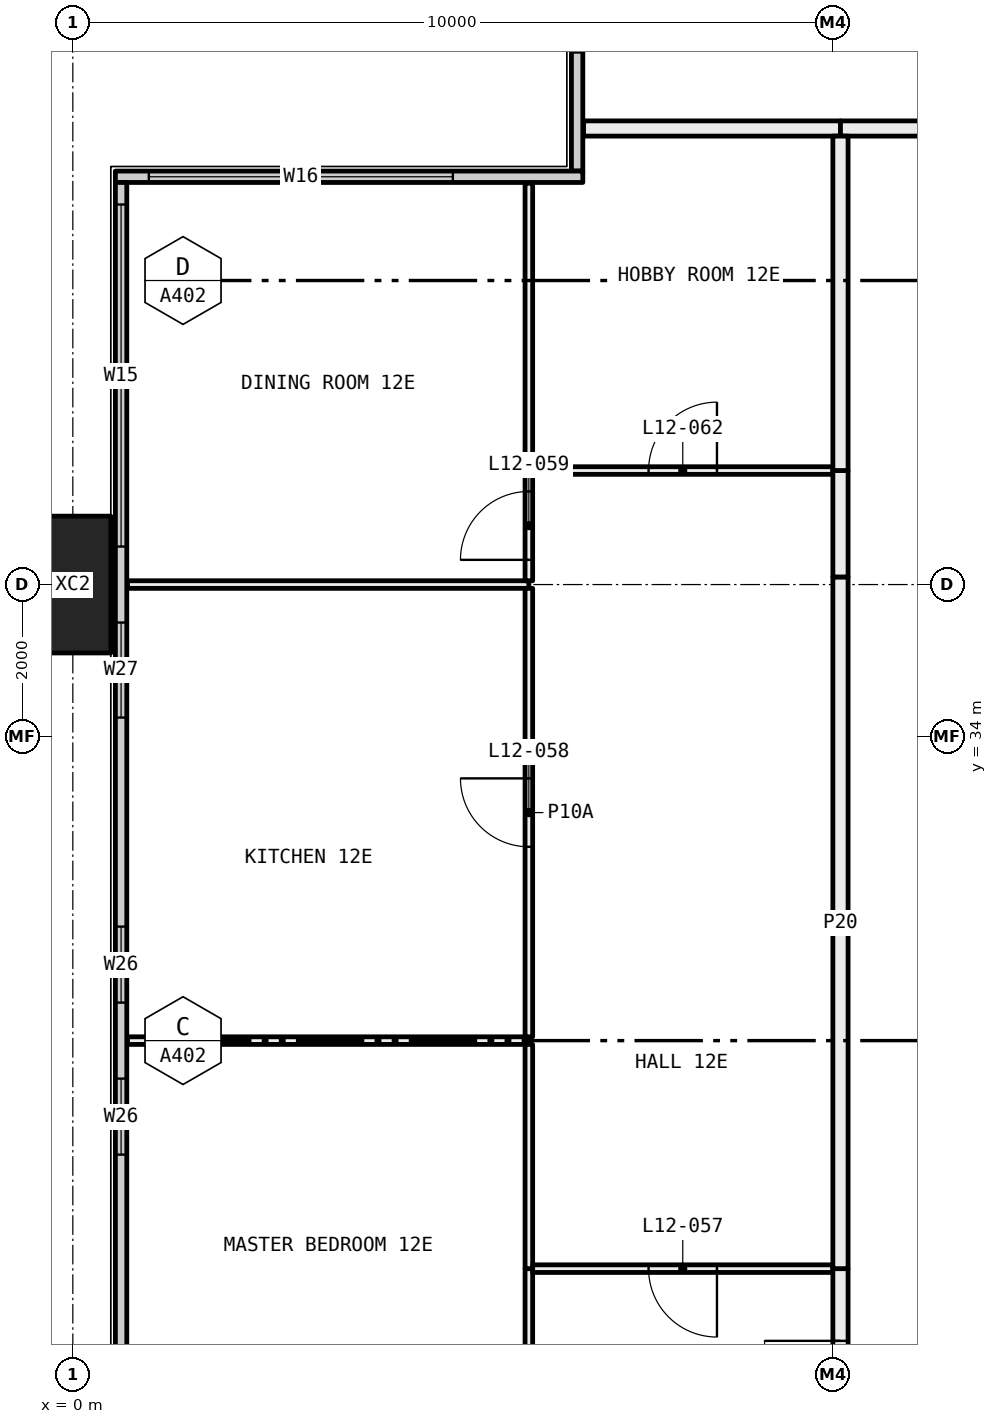
"""IFC4 building model, lengths in metres.
Left out: names, types, materials, properties, quantities, classifications, styles, units other than length and angle.
Written with IfcOpenShell. Run it as: python <this file> out.ifc"""

import sys

from ifc_helpers import new_model, si_unit, direction, frame, frame_2d, origin, origin_2d, place, context, subcontext, project, spatial, rectangle, hollow_rectangle, extrude, element, fill, save


model = new_model("IFC4")
c1 = context("Model", 3, precision=1e-05, world=origin(), true_north=direction((0.0, 1.0)))
c2 = subcontext(c1, "Body", "Model", "MODEL_VIEW")
j1 = project(units=[si_unit("LENGTHUNIT", "METRE"), si_unit("PLANEANGLEUNIT", "RADIAN")], contexts=[c1])
p1 = place(None, origin())
s1 = spatial("IfcSite", under=j1, at=p1, CompositionType="ELEMENT")
p2 = place(p1, origin())
s2 = spatial("IfcBuilding", under=s1, at=p2, CompositionType="ELEMENT")
p3 = place(p2, frame((0.0, 0.0, 54.15)))
s3 = spatial("IfcBuildingStorey", under=s2, at=p3, CompositionType="ELEMENT", Elevation=54.15)
p4 = place(p3, frame((0.0, 36.0, -0.4), z_axis=(0.0, 0.0, 1.0), x_axis=(0.0, 1.0, 0.0)))
e1 = element("IfcColumn", 1, at=p4, inside=s3, PredefinedType="COLUMN", context=c2, shape_type="SweptSolid", body=[
    extrude(hollow_rectangle(XDim=1.8, YDim=1.0, WallThickness=0.07, at=origin_2d()), origin(), (0.0, 0.0, 1.0), 3.45),
])
p5 = place(p3, frame((6.635, 41.44, 0.0), z_axis=(0.0, 0.0, 1.0), x_axis=(0.0, 1.0, 0.0)))
e2 = element("IfcWall", 2, at=p5, inside=s3, PredefinedType="ELEMENTEDWALL", context=c2, shape_type="SweptSolid", body=[
    extrude(rectangle(XDim=5.85, YDim=0.15, at=frame_2d((2.925, 0.0))), origin(), (0.0, 0.0, 1.0), 3.05),
])
p6 = place(p5, frame((1.56, 0.0, 0.45)))
e3 = element("IfcOpeningElement", 3, at=p6, cuts=e2, PredefinedType="OPENING", context=c2, shape_type="SweptSolid", body=[
    extrude(rectangle(XDim=4.0, YDim=2.55, at=frame_2d((2.0, 1.275))), frame((0.0, 0.085, 0.0), z_axis=(0.0, -1.0, 0.0), x_axis=(1.0, 0.0, 0.0)), (0.0, 0.0, 1.0), 0.17),
])
p7 = place(p3, frame((0.56, 41.365, 0.0), z_axis=(0.0, 0.0, 1.0), x_axis=(1.0, 0.0, 0.0)))
e4 = element("IfcWall", 4, at=p7, inside=s3, PredefinedType="ELEMENTEDWALL", context=c2, shape_type="SweptSolid", body=[
    extrude(rectangle(XDim=6.15, YDim=0.15, at=frame_2d((3.075, 0.0))), origin(), (0.0, 0.0, 1.0), 3.05),
])
p8 = place(p7, frame((0.44, 0.0, 0.45)))
e5 = element("IfcOpeningElement", 5, at=p8, cuts=e4, PredefinedType="OPENING", context=c2, shape_type="SweptSolid", body=[
    extrude(rectangle(XDim=4.0, YDim=2.55, at=frame_2d((2.0, 1.275))), frame((0.0, 0.085, 0.0), z_axis=(0.0, -1.0, 0.0), x_axis=(1.0, 0.0, 0.0)), (0.0, 0.0, 1.0), 0.17),
])
p9 = place(p3, frame((0.635, 6.71, 0.0), z_axis=(0.0, 0.0, 1.0), x_axis=(0.0, 1.0, 0.0)))
e6 = element("IfcWall", 6, at=p9, inside=s3, PredefinedType="ELEMENTEDWALL", context=c2, shape_type="SweptSolid", body=[
    extrude(rectangle(XDim=34.58, YDim=0.15, at=frame_2d((17.29, 0.0))), origin(), (0.0, 0.0, 1.0), 3.05),
])
p10 = place(p9, frame((0.29, 0.0, 0.45)))
e7 = element("IfcOpeningElement", 7, at=p10, cuts=e6, PredefinedType="OPENING", context=c2, shape_type="SweptSolid", body=[
    extrude(rectangle(XDim=4.5, YDim=2.55, at=frame_2d((2.25, 1.275))), frame((0.0, 0.085, 0.0), z_axis=(0.0, -1.0, 0.0), x_axis=(1.0, 0.0, 0.0)), (0.0, 0.0, 1.0), 0.17),
])
p11 = place(p9, frame((5.79, 0.0, 0.45)))
e8 = element("IfcOpeningElement", 8, at=p11, cuts=e6, PredefinedType="OPENING", context=c2, shape_type="SweptSolid", body=[
    extrude(rectangle(XDim=1.25, YDim=2.55, at=frame_2d((0.625, 1.275))), frame((0.0, 0.085, 0.0), z_axis=(0.0, -1.0, 0.0), x_axis=(1.0, 0.0, 0.0)), (0.0, 0.0, 1.0), 0.17),
])
p12 = place(p9, frame((9.79, 0.0, 0.45)))
e9 = element("IfcOpeningElement", 9, at=p12, cuts=e6, PredefinedType="OPENING", context=c2, shape_type="SweptSolid", body=[
    extrude(rectangle(XDim=1.0, YDim=2.55, at=frame_2d((0.5, 1.275))), frame((0.0, 0.085, 0.0), z_axis=(0.0, -1.0, 0.0), x_axis=(1.0, 0.0, 0.0)), (0.0, 0.0, 1.0), 0.17),
])
p13 = place(p9, frame((11.79, 0.0, 0.45)))
e10 = element("IfcOpeningElement", 10, at=p13, cuts=e6, PredefinedType="OPENING", context=c2, shape_type="SweptSolid", body=[
    extrude(rectangle(XDim=1.0, YDim=2.55, at=frame_2d((0.5, 1.275))), frame((0.0, 0.085, 0.0), z_axis=(0.0, -1.0, 0.0), x_axis=(1.0, 0.0, 0.0)), (0.0, 0.0, 1.0), 0.17),
])
p14 = place(p9, frame((15.54, 0.0, 0.45)))
e11 = element("IfcOpeningElement", 11, at=p14, cuts=e6, PredefinedType="OPENING", context=c2, shape_type="SweptSolid", body=[
    extrude(rectangle(XDim=1.25, YDim=2.55, at=frame_2d((0.625, 1.275))), frame((0.0, 0.085, 0.0), z_axis=(0.0, -1.0, 0.0), x_axis=(1.0, 0.0, 0.0)), (0.0, 0.0, 1.0), 0.17),
])
p15 = place(p9, frame((17.79, 0.0, 0.45)))
e12 = element("IfcOpeningElement", 12, at=p15, cuts=e6, PredefinedType="OPENING", context=c2, shape_type="SweptSolid", body=[
    extrude(rectangle(XDim=1.25, YDim=2.55, at=frame_2d((0.625, 1.275))), frame((0.0, 0.085, 0.0), z_axis=(0.0, -1.0, 0.0), x_axis=(1.0, 0.0, 0.0)), (0.0, 0.0, 1.0), 0.17),
])
p16 = place(p9, frame((21.79, 0.0, 0.45)))
e13 = element("IfcOpeningElement", 13, at=p16, cuts=e6, PredefinedType="OPENING", context=c2, shape_type="SweptSolid", body=[
    extrude(rectangle(XDim=1.0, YDim=2.55, at=frame_2d((0.5, 1.275))), frame((0.0, 0.085, 0.0), z_axis=(0.0, -1.0, 0.0), x_axis=(1.0, 0.0, 0.0)), (0.0, 0.0, 1.0), 0.17),
])
p17 = place(p9, frame((23.79, 0.0, 0.45)))
e14 = element("IfcOpeningElement", 14, at=p17, cuts=e6, PredefinedType="OPENING", context=c2, shape_type="SweptSolid", body=[
    extrude(rectangle(XDim=1.0, YDim=2.55, at=frame_2d((0.5, 1.275))), frame((0.0, 0.085, 0.0), z_axis=(0.0, -1.0, 0.0), x_axis=(1.0, 0.0, 0.0)), (0.0, 0.0, 1.0), 0.17),
])
p18 = place(p9, frame((27.54, 0.0, 0.45)))
e15 = element("IfcOpeningElement", 15, at=p18, cuts=e6, PredefinedType="OPENING", context=c2, shape_type="SweptSolid", body=[
    extrude(rectangle(XDim=1.25, YDim=2.55, at=frame_2d((0.625, 1.275))), frame((0.0, 0.085, 0.0), z_axis=(0.0, -1.0, 0.0), x_axis=(1.0, 0.0, 0.0)), (0.0, 0.0, 1.0), 0.17),
])
p19 = place(p9, frame((29.79, 0.0, 0.45)))
e16 = element("IfcOpeningElement", 16, at=p19, cuts=e6, PredefinedType="OPENING", context=c2, shape_type="SweptSolid", body=[
    extrude(rectangle(XDim=4.5, YDim=2.55, at=frame_2d((2.25, 1.275))), frame((0.0, 0.085, 0.0), z_axis=(0.0, -1.0, 0.0), x_axis=(1.0, 0.0, 0.0)), (0.0, 0.0, 1.0), 0.17),
])
p20 = place(p3, frame((6.72, 42.0, 0.0), z_axis=(0.0, 0.0, 1.0), x_axis=(1.0, 0.0, 0.0)))
e17 = element("IfcWall", 17, at=p20, inside=s3, PredefinedType="PARTITIONING", context=c2, shape_type="SweptSolid", body=[
    extrude(rectangle(XDim=3.38, YDim=0.2, at=frame_2d((1.69, 0.0))), origin(), (0.0, 0.0, 1.0), 3.05),
])
p21 = place(p3, frame((10.1, 42.0, 0.0), z_axis=(0.0, 0.0, 1.0), x_axis=(1.0, 0.0, 0.0)))
e18 = element("IfcWall", 18, at=p21, inside=s3, PredefinedType="PARTITIONING", context=c2, shape_type="SweptSolid", body=[
    extrude(rectangle(XDim=1.9, YDim=0.2, at=frame_2d((0.95, 0.0))), origin(), (0.0, 0.0, 1.0), 3.05),
])
p22 = place(p3, frame((6.0, 30.0, 0.0), z_axis=(0.0, 0.0, 1.0), x_axis=(-1.0, 0.0, 0.0)))
e19 = element("IfcWall", 19, at=p22, inside=s3, PredefinedType="PARTITIONING", context=c2, shape_type="SweptSolid", body=[
    extrude(rectangle(XDim=5.28, YDim=0.1, at=frame_2d((2.64, 0.0))), origin(), (0.0, 0.0, 1.0), 3.05),
])
p23 = place(p3, frame((6.0, 24.05, 0.0), z_axis=(0.0, 0.0, 1.0), x_axis=(0.0, 1.0, 0.0)))
e20 = element("IfcWall", 20, at=p23, inside=s3, PredefinedType="PARTITIONING", context=c2, shape_type="SweptSolid", body=[
    extrude(rectangle(XDim=2.95, YDim=0.1, at=frame_2d((1.475, 0.0))), origin(), (0.0, 0.0, 1.0), 2.45),
])
p24 = place(p3, frame((6.0, 27.0, 0.0), z_axis=(0.0, 0.0, 1.0), x_axis=(0.0, 1.0, 0.0)))
e21 = element("IfcWall", 21, at=p24, inside=s3, PredefinedType="PARTITIONING", context=c2, shape_type="SweptSolid", body=[
    extrude(rectangle(XDim=2.95, YDim=0.1, at=frame_2d((1.475, 0.0))), origin(), (0.0, 0.0, 1.0), 3.05),
])
p25 = place(p3, frame((6.0, 36.0, 0.0), z_axis=(0.0, 0.0, 1.0), x_axis=(-1.0, 0.0, 0.0)))
e22 = element("IfcWall", 22, at=p25, inside=s3, PredefinedType="PARTITIONING", context=c2, shape_type="SweptSolid", body=[
    extrude(rectangle(XDim=5.28, YDim=0.1, at=frame_2d((2.64, 0.0))), origin(), (0.0, 0.0, 1.0), 2.45),
])
p26 = place(p3, frame((6.0, 30.05, 0.0), z_axis=(0.0, 0.0, 1.0), x_axis=(0.0, 1.0, 0.0)))
e23 = element("IfcWall", 23, at=p26, inside=s3, PredefinedType="PARTITIONING", context=c2, shape_type="SweptSolid", body=[
    extrude(rectangle(XDim=5.9, YDim=0.1, at=frame_2d((2.95, 0.0))), origin(), (0.0, 0.0, 1.0), 2.45),
])
p27 = place(p26, frame((2.5, 0.0, 0.0)))
e24 = element("IfcOpeningElement", 24, at=p27, cuts=e23, PredefinedType="OPENING", context=c2, shape_type="SweptSolid", body=[
    extrude(rectangle(XDim=0.9, YDim=2.1, at=frame_2d((0.45, 1.05))), frame((0.0, 0.06, 0.0), z_axis=(0.0, -1.0, 0.0), x_axis=(1.0, 0.0, 0.0)), (0.0, 0.0, 1.0), 0.12),
])
p28 = place(p3, frame((6.0, 36.05, 0.0), z_axis=(0.0, 0.0, 1.0), x_axis=(0.0, 1.0, 0.0)))
e25 = element("IfcWall", 25, at=p28, inside=s3, PredefinedType="PARTITIONING", context=c2, shape_type="SweptSolid", body=[
    extrude(rectangle(XDim=1.45, YDim=0.1, at=frame_2d((0.725, 0.0))), origin(), (0.0, 0.0, 1.0), 2.45),
])
p29 = place(p28, frame((0.275, 0.0, 0.0)))
e26 = element("IfcOpeningElement", 26, at=p29, cuts=e25, PredefinedType="OPENING", context=c2, shape_type="SweptSolid", body=[
    extrude(rectangle(XDim=0.9, YDim=2.1, at=frame_2d((0.45, 1.05))), frame((0.0, 0.06, 0.0), z_axis=(0.0, -1.0, 0.0), x_axis=(1.0, 0.0, 0.0)), (0.0, 0.0, 1.0), 0.12),
])
p30 = place(p3, frame((6.0, 37.5, 0.0), z_axis=(0.0, 0.0, 1.0), x_axis=(0.0, 1.0, 0.0)))
e27 = element("IfcWall", 27, at=p30, inside=s3, PredefinedType="PARTITIONING", context=c2, shape_type="SweptSolid", body=[
    extrude(rectangle(XDim=3.78, YDim=0.1, at=frame_2d((1.89, 0.0))), origin(), (0.0, 0.0, 1.0), 3.05),
])
p31 = place(p3, frame((10.0, 27.0, 0.0), z_axis=(0.0, 0.0, 1.0), x_axis=(-1.0, 0.0, 0.0)))
e28 = element("IfcWall", 28, at=p31, inside=s3, PredefinedType="PARTITIONING", context=c2, shape_type="SweptSolid", body=[
    extrude(rectangle(XDim=3.95, YDim=0.1, at=frame_2d((1.975, 0.0))), origin(), (0.0, 0.0, 1.0), 3.05),
])
p32 = place(p31, frame((1.525, 0.0, 0.0)))
e29 = element("IfcOpeningElement", 29, at=p32, cuts=e28, PredefinedType="OPENING", context=c2, shape_type="SweptSolid", body=[
    extrude(rectangle(XDim=0.9, YDim=2.1, at=frame_2d((0.45, 1.05))), frame((0.0, 0.06, 0.0), z_axis=(0.0, -1.0, 0.0), x_axis=(1.0, 0.0, 0.0)), (0.0, 0.0, 1.0), 0.12),
])
p33 = place(p3, frame((10.1, 24.1, 0.0), z_axis=(0.0, 0.0, 1.0), x_axis=(0.0, 1.0, 0.0)))
e30 = element("IfcWall", 30, at=p33, inside=s3, PredefinedType="PARTITIONING", context=c2, shape_type="SweptSolid", body=[
    extrude(rectangle(XDim=2.9, YDim=0.2, at=frame_2d((1.45, 0.0))), origin(), (0.0, 0.0, 1.0), 3.05),
])
p34 = place(p33, frame((0.95, 0.0, 0.0)))
e31 = element("IfcOpeningElement", 31, at=p34, cuts=e30, PredefinedType="OPENING", context=c2, shape_type="SweptSolid", body=[
    extrude(rectangle(XDim=1.0, YDim=2.1, at=frame_2d((0.5, 1.05))), frame((0.0, 0.11, 0.0), z_axis=(0.0, -1.0, 0.0), x_axis=(1.0, 0.0, 0.0)), (0.0, 0.0, 1.0), 0.22),
])
p35 = place(p3, frame((10.0, 37.5, 0.0), z_axis=(0.0, 0.0, 1.0), x_axis=(-1.0, 0.0, 0.0)))
e32 = element("IfcWall", 32, at=p35, inside=s3, PredefinedType="PARTITIONING", context=c2, shape_type="SweptSolid", body=[
    extrude(rectangle(XDim=3.95, YDim=0.1, at=frame_2d((1.975, 0.0))), origin(), (0.0, 0.0, 1.0), 3.05),
])
p36 = place(p35, frame((1.525, 0.0, 0.0)))
e33 = element("IfcOpeningElement", 33, at=p36, cuts=e32, PredefinedType="OPENING", context=c2, shape_type="SweptSolid", body=[
    extrude(rectangle(XDim=0.9, YDim=2.1, at=frame_2d((0.45, 1.05))), frame((0.0, 0.06, 0.0), z_axis=(0.0, -1.0, 0.0), x_axis=(1.0, 0.0, 0.0)), (0.0, 0.0, 1.0), 0.12),
])
p37 = place(p3, frame((10.1, 27.0, 0.0), z_axis=(0.0, 0.0, 1.0), x_axis=(0.0, 1.0, 0.0)))
e34 = element("IfcWall", 34, at=p37, inside=s3, PredefinedType="PARTITIONING", context=c2, shape_type="SweptSolid", body=[
    extrude(rectangle(XDim=9.1, YDim=0.2, at=frame_2d((4.55, 0.0))), origin(), (0.0, 0.0, 1.0), 2.45),
])
p38 = place(p3, frame((10.1, 36.1, 0.0), z_axis=(0.0, 0.0, 1.0), x_axis=(0.0, 1.0, 0.0)))
e35 = element("IfcWall", 35, at=p38, inside=s3, PredefinedType="PARTITIONING", context=c2, shape_type="SweptSolid", body=[
    extrude(rectangle(XDim=1.4, YDim=0.2, at=frame_2d((0.7, 0.0))), origin(), (0.0, 0.0, 1.0), 3.05),
])
p39 = place(p3, frame((10.1, 37.5, 0.0), z_axis=(0.0, 0.0, 1.0), x_axis=(0.0, 1.0, 0.0)))
e36 = element("IfcWall", 36, at=p39, inside=s3, PredefinedType="PARTITIONING", context=c2, shape_type="SweptSolid", body=[
    extrude(rectangle(XDim=4.4, YDim=0.2, at=frame_2d((2.2, 0.0))), origin(), (0.0, 0.0, 1.0), 3.05),
])
p40 = place(p8, origin())
e37 = element("IfcWindow", 37, at=p40, inside=s3, PartitioningType="SINGLE_PANEL", PredefinedType="WINDOW", context=c2, shape_type="SweptSolid", body=[
    extrude(rectangle(XDim=4.0, YDim=2.55, at=frame_2d((2.0, 1.275))), frame((0.0, 0.03, 0.0), z_axis=(0.0, -1.0, 0.0), x_axis=(1.0, 0.0, 0.0)), (0.0, 0.0, 1.0), 0.06),
])
fill(e5, e37)
p41 = place(p16, origin())
e38 = element("IfcWindow", 38, at=p41, inside=s3, PartitioningType="SINGLE_PANEL", PredefinedType="WINDOW", context=c2, shape_type="SweptSolid", body=[
    extrude(rectangle(XDim=1.0, YDim=2.55, at=frame_2d((0.5, 1.275))), frame((0.0, 0.03, 0.0), z_axis=(0.0, -1.0, 0.0), x_axis=(1.0, 0.0, 0.0)), (0.0, 0.0, 1.0), 0.06),
])
fill(e13, e38)
p42 = place(p17, origin())
e39 = element("IfcWindow", 39, at=p42, inside=s3, PartitioningType="SINGLE_PANEL", PredefinedType="WINDOW", context=c2, shape_type="SweptSolid", body=[
    extrude(rectangle(XDim=1.0, YDim=2.55, at=frame_2d((0.5, 1.275))), frame((0.0, 0.03, 0.0), z_axis=(0.0, -1.0, 0.0), x_axis=(1.0, 0.0, 0.0)), (0.0, 0.0, 1.0), 0.06),
])
fill(e14, e39)
p43 = place(p18, origin())
e40 = element("IfcWindow", 40, at=p43, inside=s3, PartitioningType="SINGLE_PANEL", PredefinedType="WINDOW", context=c2, shape_type="SweptSolid", body=[
    extrude(rectangle(XDim=1.25, YDim=2.55, at=frame_2d((0.625, 1.275))), frame((0.0, 0.03, 0.0), z_axis=(0.0, -1.0, 0.0), x_axis=(1.0, 0.0, 0.0)), (0.0, 0.0, 1.0), 0.06),
])
fill(e15, e40)
p44 = place(p19, origin())
e41 = element("IfcWindow", 41, at=p44, inside=s3, PartitioningType="SINGLE_PANEL", PredefinedType="WINDOW", context=c2, shape_type="SweptSolid", body=[
    extrude(rectangle(XDim=4.5, YDim=2.55, at=frame_2d((2.25, 1.275))), frame((0.0, 0.03, 0.0), z_axis=(0.0, -1.0, 0.0), x_axis=(1.0, 0.0, 0.0)), (0.0, 0.0, 1.0), 0.06),
])
fill(e16, e41)
p45 = place(p34, origin())
e42 = element("IfcDoor", 42, at=p45, inside=s3, OperationType="SINGLE_SWING_LEFT", PredefinedType="DOOR", context=c2, shape_type="SweptSolid", body=[
    extrude(rectangle(XDim=1.0, YDim=2.1, at=frame_2d((0.5, 1.05))), frame((0.0, 0.025, 0.0), z_axis=(0.0, -1.0, 0.0), x_axis=(1.0, 0.0, 0.0)), (0.0, 0.0, 1.0), 0.05),
])
fill(e31, e42)
p46 = place(p32, origin())
e43 = element("IfcDoor", 43, at=p46, inside=s3, OperationType="SINGLE_SWING_RIGHT", PredefinedType="DOOR", context=c2, shape_type="SweptSolid", body=[
    extrude(rectangle(XDim=0.9, YDim=2.1, at=frame_2d((0.45, 1.05))), frame((0.0, 0.025, 0.0), z_axis=(0.0, -1.0, 0.0), x_axis=(1.0, 0.0, 0.0)), (0.0, 0.0, 1.0), 0.05),
])
fill(e29, e43)
p47 = place(p27, origin())
e44 = element("IfcDoor", 44, at=p47, inside=s3, OperationType="SINGLE_SWING_LEFT", PredefinedType="DOOR", context=c2, shape_type="SweptSolid", body=[
    extrude(rectangle(XDim=0.9, YDim=2.1, at=frame_2d((0.45, 1.05))), frame((0.0, 0.025, 0.0), z_axis=(0.0, -1.0, 0.0), x_axis=(1.0, 0.0, 0.0)), (0.0, 0.0, 1.0), 0.05),
])
fill(e24, e44)
p48 = place(p29, origin())
e45 = element("IfcDoor", 45, at=p48, inside=s3, OperationType="SINGLE_SWING_RIGHT", PredefinedType="DOOR", context=c2, shape_type="SweptSolid", body=[
    extrude(rectangle(XDim=0.9, YDim=2.1, at=frame_2d((0.45, 1.05))), frame((0.0, 0.025, 0.0), z_axis=(0.0, -1.0, 0.0), x_axis=(1.0, 0.0, 0.0)), (0.0, 0.0, 1.0), 0.05),
])
fill(e26, e45)
p49 = place(p36, frame((0.9, 0.0, 0.0), x_axis=(-1.0, 0.0, 0.0)))
e46 = element("IfcDoor", 46, at=p49, inside=s3, OperationType="SINGLE_SWING_LEFT", PredefinedType="DOOR", context=c2, shape_type="SweptSolid", body=[
    extrude(rectangle(XDim=0.9, YDim=2.1, at=frame_2d((0.45, 1.05))), frame((0.0, 0.025, 0.0), z_axis=(0.0, -1.0, 0.0), x_axis=(1.0, 0.0, 0.0)), (0.0, 0.0, 1.0), 0.05),
])
fill(e33, e46)
save(model, sys.argv[1])
